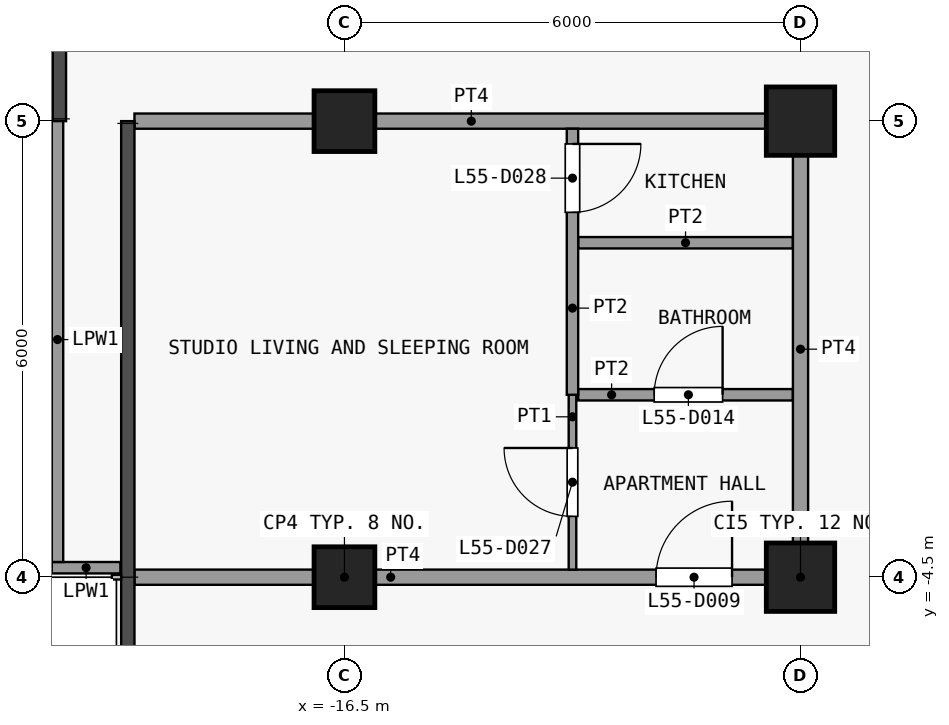
"""IFC4 building model, lengths in metres.
Left out: names, types, materials, properties, quantities, classifications, styles, units other than length and angle.
Written with IfcOpenShell. Run it as: python <this file> out.ifc"""

import sys

from ifc_helpers import new_model, si_unit, direction, frame, frame_2d, origin, origin_2d, place, context, subcontext, project, spatial, rectangle, extrude, element, fill, save


model = new_model("IFC4")
c1 = context("Model", 3, precision=1e-05, world=origin(), true_north=direction((0.0, 1.0)))
c2 = subcontext(c1, "Body", "Model", "MODEL_VIEW")
j1 = project(units=[si_unit("LENGTHUNIT", "METRE"), si_unit("PLANEANGLEUNIT", "RADIAN")], contexts=[c1])
p1 = place(None, origin())
s1 = spatial("IfcSite", under=j1, at=p1, CompositionType="ELEMENT")
p2 = place(p1, origin())
s2 = spatial("IfcBuilding", under=s1, at=p2, CompositionType="ELEMENT")
p3 = place(p2, frame((0.0, 0.0, 219.5)))
s3 = spatial("IfcBuildingStorey", under=s2, at=p3, CompositionType="ELEMENT", Elevation=219.5)
for number, where, z_axis, x_axis in (
    (1, (-16.5, -4.5, 0.0), (0.0, 0.0, 1.0), (1.0, 0.0, 0.0)),
    (2, (-16.5, 1.5, 0.0), (0.0, 0.0, 1.0), (1.0, 0.0, 0.0)),
):
    element("IfcColumn", number, at=place(p3, frame(where, z_axis=z_axis, x_axis=x_axis)), inside=s3, PredefinedType="COLUMN", context=c2, shape_type="SweptSolid", body=[
        extrude(rectangle(XDim=0.8, YDim=0.8, at=origin_2d()), origin(), (0.0, 0.0, 1.0), 3.6),
    ])
for number, where, z_axis, x_axis in (
    (3, (-10.5, -4.5, 0.0), (0.0, 0.0, 1.0), (1.0, 0.0, 0.0)),
    (4, (-10.5, 1.5, 0.0), (0.0, 0.0, 1.0), (1.0, 0.0, 0.0)),
):
    element("IfcColumn", number, at=place(p3, frame(where, z_axis=z_axis, x_axis=x_axis)), inside=s3, PredefinedType="COLUMN", context=c2, shape_type="SweptSolid", body=[
        extrude(rectangle(XDim=0.9, YDim=0.9, at=origin_2d()), origin(), (0.0, 0.0, 1.0), 3.6),
    ])
p4 = place(p3, frame((-19.448, -4.375, 0.0), z_axis=(0.0, 0.0, 1.0), x_axis=(-1.0, 0.0, 0.0)))
e5 = element("IfcWall", 5, at=p4, inside=s3, PredefinedType="PARAPET", context=c2, shape_type="SweptSolid", body=[
    extrude(rectangle(XDim=0.903, YDim=0.15, at=frame_2d((0.451, 0.0))), origin(), (0.0, 0.0, 1.0), 1.15),
])
p5 = place(p3, frame((-20.275, -4.3, 0.0), z_axis=(0.0, 0.0, 1.0), x_axis=(0.0, 1.0, 0.0)))
e6 = element("IfcWall", 6, at=p5, inside=s3, PredefinedType="PARAPET", context=c2, shape_type="SweptSolid", body=[
    extrude(rectangle(XDim=5.853, YDim=0.15, at=frame_2d((2.926, 0.0))), origin(), (0.0, 0.0, 1.0), 1.15),
])
p6 = place(p3, frame((-19.262, -4.5, 0.0), z_axis=(0.0, 0.0, 1.0), x_axis=(1.0, 0.0, 0.0)))
e7 = element("IfcWall", 7, at=p6, inside=s3, PredefinedType="PARTITIONING", context=c2, shape_type="SweptSolid", body=[
    extrude(rectangle(XDim=8.863, YDim=0.2, at=frame_2d((4.431, 0.0))), origin(), (0.0, 0.0, 1.0), 3.3),
])
p7 = place(p6, frame((6.862, 0.0, 0.0)))
e8 = element("IfcOpeningElement", 8, at=p7, cuts=e7, PredefinedType="OPENING", context=c2, shape_type="SweptSolid", body=[
    extrude(rectangle(XDim=1.0, YDim=2.1, at=frame_2d((0.5, 1.05))), frame((0.0, 0.11, 0.0), z_axis=(0.0, -1.0, 0.0), x_axis=(1.0, 0.0, 0.0)), (0.0, 0.0, 1.0), 0.22),
])
p8 = place(p3, frame((-13.425, -2.1, 0.0), z_axis=(0.0, 0.0, 1.0), x_axis=(1.0, 0.0, 0.0)))
e9 = element("IfcWall", 9, at=p8, inside=s3, PredefinedType="PARTITIONING", context=c2, shape_type="SweptSolid", body=[
    extrude(rectangle(XDim=2.825, YDim=0.15, at=frame_2d((1.413, 0.0))), origin(), (0.0, 0.0, 1.0), 3.3),
])
p9 = place(p8, frame((1.0, 0.0, 0.0)))
e10 = element("IfcOpeningElement", 10, at=p9, cuts=e9, PredefinedType="OPENING", context=c2, shape_type="SweptSolid", body=[
    extrude(rectangle(XDim=0.9, YDim=2.1, at=frame_2d((0.45, 1.05))), frame((0.0, 0.085, 0.0), z_axis=(0.0, -1.0, 0.0), x_axis=(1.0, 0.0, 0.0)), (0.0, 0.0, 1.0), 0.17),
])
p10 = place(p3, frame((-13.425, -0.1, 0.0), z_axis=(0.0, 0.0, 1.0), x_axis=(1.0, 0.0, 0.0)))
e11 = element("IfcWall", 11, at=p10, inside=s3, PredefinedType="PARTITIONING", context=c2, shape_type="SweptSolid", body=[
    extrude(rectangle(XDim=2.825, YDim=0.15, at=frame_2d((1.413, 0.0))), origin(), (0.0, 0.0, 1.0), 3.3),
])
p11 = place(p3, frame((-19.262, 1.5, 0.0), z_axis=(0.0, 0.0, 1.0), x_axis=(1.0, 0.0, 0.0)))
e12 = element("IfcWall", 12, at=p11, inside=s3, PredefinedType="PARTITIONING", context=c2, shape_type="SweptSolid", body=[
    extrude(rectangle(XDim=8.863, YDim=0.2, at=frame_2d((4.431, 0.0))), origin(), (0.0, 0.0, 1.0), 3.3),
])
p12 = place(p3, frame((-13.5, -4.4, 0.0), z_axis=(0.0, 0.0, 1.0), x_axis=(0.0, 1.0, 0.0)))
e13 = element("IfcWall", 13, at=p12, inside=s3, PredefinedType="PARTITIONING", context=c2, shape_type="SweptSolid", body=[
    extrude(rectangle(XDim=2.3, YDim=0.1, at=frame_2d((1.15, 0.0))), origin(), (0.0, 0.0, 1.0), 3.3),
])
p13 = place(p12, frame((0.7, 0.0, 0.0)))
e14 = element("IfcOpeningElement", 14, at=p13, cuts=e13, PredefinedType="OPENING", context=c2, shape_type="SweptSolid", body=[
    extrude(rectangle(XDim=0.9, YDim=2.1, at=frame_2d((0.45, 1.05))), frame((0.0, 0.06, 0.0), z_axis=(0.0, -1.0, 0.0), x_axis=(1.0, 0.0, 0.0)), (0.0, 0.0, 1.0), 0.12),
])
p14 = place(p3, frame((-13.5, -2.1, 0.0), z_axis=(0.0, 0.0, 1.0), x_axis=(0.0, 1.0, 0.0)))
e15 = element("IfcWall", 15, at=p14, inside=s3, PredefinedType="PARTITIONING", context=c2, shape_type="SweptSolid", body=[
    extrude(rectangle(XDim=3.5, YDim=0.15, at=frame_2d((1.75, 0.0))), origin(), (0.0, 0.0, 1.0), 3.3),
])
p15 = place(p14, frame((2.4, 0.0, 0.0)))
e16 = element("IfcOpeningElement", 16, at=p15, cuts=e15, PredefinedType="OPENING", context=c2, shape_type="SweptSolid", body=[
    extrude(rectangle(XDim=0.9, YDim=2.1, at=frame_2d((0.45, 1.05))), frame((0.0, 0.085, 0.0), z_axis=(0.0, -1.0, 0.0), x_axis=(1.0, 0.0, 0.0)), (0.0, 0.0, 1.0), 0.17),
])
p16 = place(p3, frame((-10.5, -4.4, 0.0), z_axis=(0.0, 0.0, 1.0), x_axis=(0.0, 1.0, 0.0)))
e17 = element("IfcWall", 17, at=p16, inside=s3, PredefinedType="PARTITIONING", context=c2, shape_type="SweptSolid", body=[
    extrude(rectangle(XDim=5.8, YDim=0.2, at=frame_2d((2.9, 0.0))), origin(), (0.0, 0.0, 1.0), 3.3),
])
p17 = place(p7, origin())
e18 = element("IfcDoor", 18, at=p17, inside=s3, OperationType="SINGLE_SWING_LEFT", PredefinedType="DOOR", context=c2, shape_type="SweptSolid", body=[
    extrude(rectangle(XDim=1.0, YDim=2.1, at=frame_2d((0.5, 1.05))), frame((0.0, 0.025, 0.0), z_axis=(0.0, -1.0, 0.0), x_axis=(1.0, 0.0, 0.0)), (0.0, 0.0, 1.0), 0.05),
])
fill(e8, e18)
p18 = place(p9, origin())
e19 = element("IfcDoor", 19, at=p18, inside=s3, OperationType="SINGLE_SWING_LEFT", PredefinedType="DOOR", context=c2, shape_type="SweptSolid", body=[
    extrude(rectangle(XDim=0.9, YDim=2.1, at=frame_2d((0.45, 1.05))), frame((0.0, 0.025, 0.0), z_axis=(0.0, -1.0, 0.0), x_axis=(1.0, 0.0, 0.0)), (0.0, 0.0, 1.0), 0.05),
])
fill(e10, e19)
p19 = place(p13, origin())
e20 = element("IfcDoor", 20, at=p19, inside=s3, OperationType="SINGLE_SWING_LEFT", PredefinedType="DOOR", context=c2, shape_type="SweptSolid", body=[
    extrude(rectangle(XDim=0.9, YDim=2.1, at=frame_2d((0.45, 1.05))), frame((0.0, 0.025, 0.0), z_axis=(0.0, -1.0, 0.0), x_axis=(1.0, 0.0, 0.0)), (0.0, 0.0, 1.0), 0.05),
])
fill(e14, e20)
p20 = place(p15, origin())
e21 = element("IfcDoor", 21, at=p20, inside=s3, OperationType="SINGLE_SWING_RIGHT", PredefinedType="DOOR", context=c2, shape_type="SweptSolid", body=[
    extrude(rectangle(XDim=0.9, YDim=2.1, at=frame_2d((0.45, 1.05))), frame((0.0, 0.025, 0.0), z_axis=(0.0, -1.0, 0.0), x_axis=(1.0, 0.0, 0.0)), (0.0, 0.0, 1.0), 0.05),
])
fill(e16, e21)
save(model, sys.argv[1])
